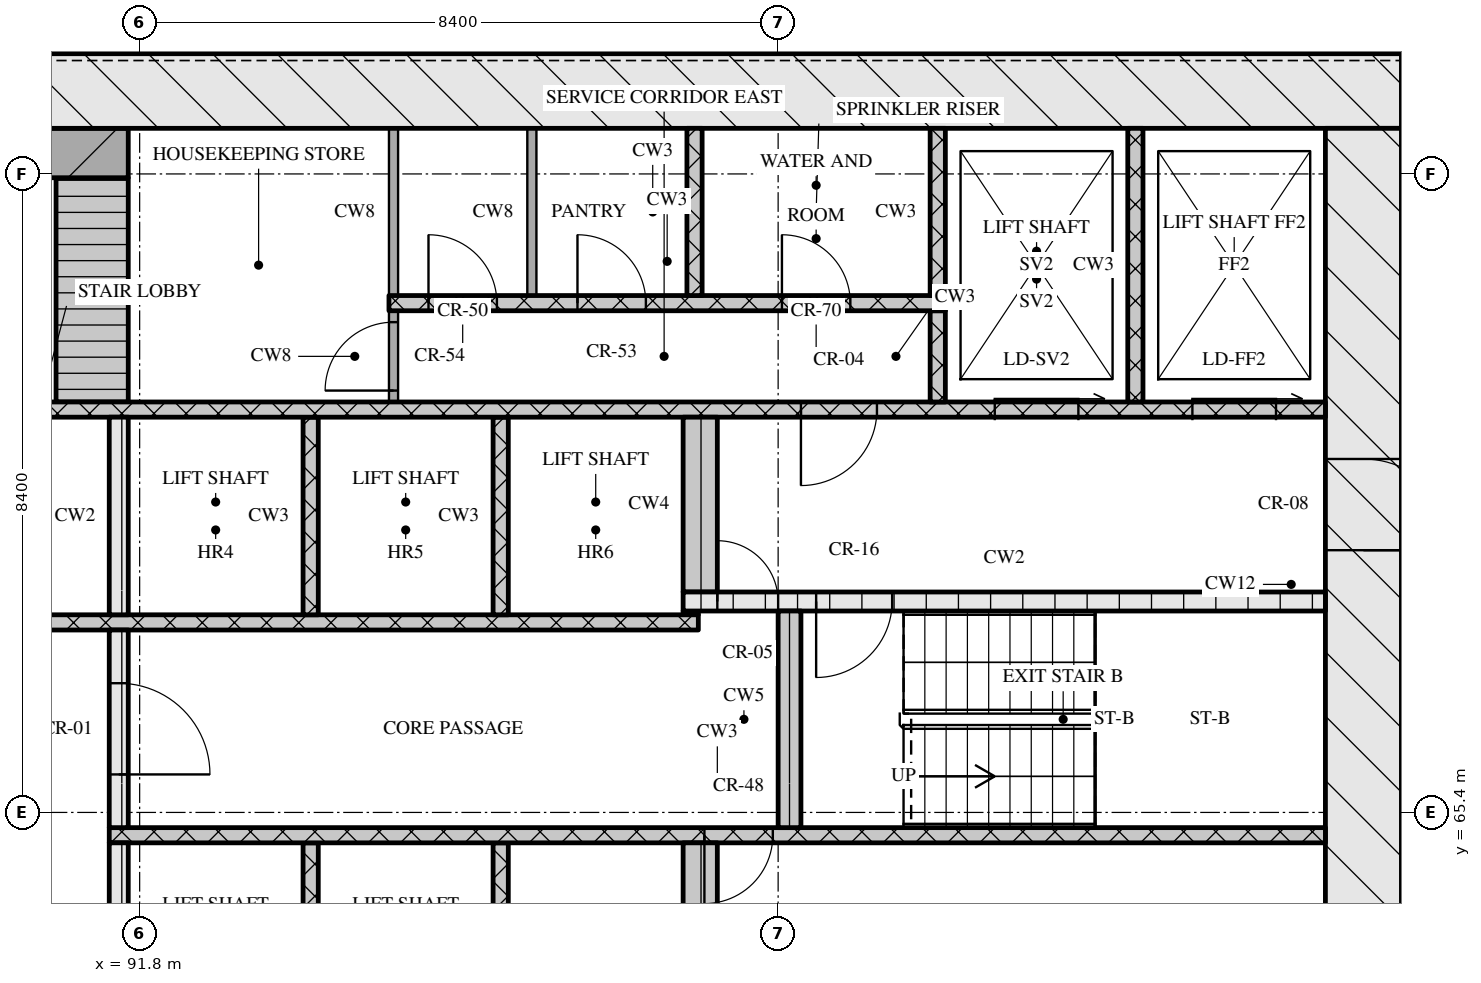
"""IFC4 building model, lengths in metres.
Left out: names, types, materials, properties, quantities, classifications, styles, units other than length and angle.
Written with IfcOpenShell. Run it as: python <this file> out.ifc"""

import sys

from ifc_helpers import new_model, si_unit, direction, frame, frame_2d, origin, place, context, subcontext, project, spatial, rectangle, extrude, element, fill, save


model = new_model("IFC4")
c1 = context("Model", 3, precision=1e-05, world=origin(), true_north=direction((0.0, 1.0)))
c2 = subcontext(c1, "Body", "Model", "MODEL_VIEW")
j1 = project(units=[si_unit("LENGTHUNIT", "METRE"), si_unit("PLANEANGLEUNIT", "RADIAN")], contexts=[c1])
p1 = place(None, origin())
s1 = spatial("IfcSite", under=j1, at=p1, CompositionType="ELEMENT")
p2 = place(p1, origin())
s2 = spatial("IfcBuilding", under=s1, at=p2, CompositionType="ELEMENT")
p3 = place(p2, frame((0.0, 0.0, 124.05)))
s3 = spatial("IfcBuildingStorey", under=s2, at=p3, CompositionType="ELEMENT", Elevation=124.05)
p4 = place(p3, frame((66.8, 74.9, 0.0), z_axis=(0.0, 0.0, 1.0), x_axis=(1.0, 0.0, 0.0)))
e1 = element("IfcWall", 1, at=p4, inside=s3, PredefinedType="SOLIDWALL", context=c2, shape_type="SweptSolid", body=[
    extrude(rectangle(XDim=41.6, YDim=1.0, at=frame_2d((20.8, 0.0))), origin(), (0.0, 0.0, 1.0), 3.32),
])
p5 = place(p3, frame((107.9, 62.4, 0.0), z_axis=(0.0, 0.0, 1.0), x_axis=(0.0, 1.0, 0.0)))
e2 = element("IfcWall", 2, at=p5, inside=s3, PredefinedType="SOLIDWALL", context=c2, shape_type="SweptSolid", body=[
    extrude(rectangle(XDim=12.0, YDim=1.0, at=frame_2d((6.0, 0.0))), origin(), (0.0, 0.0, 1.0), 3.32),
])
p6 = place(p5, frame((6.45, 0.0, 0.0)))
e3 = element("IfcOpeningElement", 3, at=p6, cuts=e2, PredefinedType="OPENING", context=c2, shape_type="SweptSolid", body=[
    extrude(rectangle(XDim=1.2, YDim=2.1, at=frame_2d((0.6, 1.05))), frame((0.0, 0.51, 0.0), z_axis=(0.0, -1.0, 0.0), x_axis=(1.0, 0.0, 0.0)), (0.0, 0.0, 1.0), 1.02),
])
p7 = place(p3, frame((91.525, 62.4, 0.0), z_axis=(0.0, 0.0, 1.0), x_axis=(0.0, 1.0, 0.0)))
e4 = element("IfcWall", 4, at=p7, inside=s3, PredefinedType="SOLIDWALL", context=c2, shape_type="SweptSolid", body=[
    extrude(rectangle(XDim=2.6, YDim=0.25, at=frame_2d((1.3, 0.0))), origin(), (0.0, 0.0, 1.0), 3.32),
])
for number, where, z_axis, x_axis in (
    (5, (94.05, 62.4, 0.0), (0.0, 0.0, 1.0), (0.0, 1.0, 0.0)),
    (6, (96.55, 62.4, 0.0), (0.0, 0.0, 1.0), (0.0, 1.0, 0.0)),
):
    element("IfcWall", number, at=place(p3, frame(where, z_axis=z_axis, x_axis=x_axis)), inside=s3, PredefinedType="SOLIDWALL", context=c2, shape_type="SweptSolid", body=[
        extrude(rectangle(XDim=2.6, YDim=0.2, at=frame_2d((1.3, 0.0))), origin(), (0.0, 0.0, 1.0), 3.32),
    ])
p8 = place(p3, frame((99.175, 62.4, 0.0), z_axis=(0.0, 0.0, 1.0), x_axis=(0.0, 1.0, 0.0)))
e7 = element("IfcWall", 7, at=p8, inside=s3, PredefinedType="SOLIDWALL", context=c2, shape_type="SweptSolid", body=[
    extrude(rectangle(XDim=2.6, YDim=0.45, at=frame_2d((1.3, 0.0))), origin(), (0.0, 0.0, 1.0), 3.32),
])
p9 = place(p3, frame((91.4, 65.1, 0.0), z_axis=(0.0, 0.0, 1.0), x_axis=(1.0, 0.0, 0.0)))
e8 = element("IfcWall", 8, at=p9, inside=s3, PredefinedType="SOLIDWALL", context=c2, shape_type="SweptSolid", body=[
    extrude(rectangle(XDim=16.0, YDim=0.2, at=frame_2d((8.0, 0.0))), origin(), (0.0, 0.0, 1.0), 3.32),
])
p10 = place(p9, frame((7.83, 0.0, 0.0)))
e9 = element("IfcOpeningElement", 9, at=p10, cuts=e8, PredefinedType="OPENING", context=c2, shape_type="SweptSolid", body=[
    extrude(rectangle(XDim=0.9, YDim=2.1, at=frame_2d((0.45, 1.05))), frame((0.0, 0.11, 0.0), z_axis=(0.0, -1.0, 0.0), x_axis=(1.0, 0.0, 0.0)), (0.0, 0.0, 1.0), 0.22),
])
p11 = place(p3, frame((91.525, 65.2, 0.0), z_axis=(0.0, 0.0, 1.0), x_axis=(0.0, 1.0, 0.0)))
e10 = element("IfcWall", 10, at=p11, inside=s3, PredefinedType="SOLIDWALL", context=c2, shape_type="SweptSolid", body=[
    extrude(rectangle(XDim=2.6, YDim=0.25, at=frame_2d((1.3, 0.0))), origin(), (0.0, 0.0, 1.0), 3.32),
])
p12 = place(p11, frame((0.7, 0.0, 0.0)))
e11 = element("IfcOpeningElement", 11, at=p12, cuts=e10, PredefinedType="OPENING", context=c2, shape_type="SweptSolid", body=[
    extrude(rectangle(XDim=1.2, YDim=2.1, at=frame_2d((0.6, 1.05))), frame((0.0, 0.135, 0.0), z_axis=(0.0, -1.0, 0.0), x_axis=(1.0, 0.0, 0.0)), (0.0, 0.0, 1.0), 0.27),
])
p13 = place(p3, frame((100.35, 65.2, 0.0), z_axis=(0.0, 0.0, 1.0), x_axis=(0.0, 1.0, 0.0)))
e12 = element("IfcWall", 12, at=p13, inside=s3, PredefinedType="SOLIDWALL", context=c2, shape_type="SweptSolid", body=[
    extrude(rectangle(XDim=2.85, YDim=0.3, at=frame_2d((1.425, 0.0))), origin(), (0.0, 0.0, 1.0), 3.32),
])
p14 = place(p3, frame((76.05, 67.9, 0.0), z_axis=(0.0, 0.0, 1.0), x_axis=(1.0, 0.0, 0.0)))
e13 = element("IfcWall", 13, at=p14, inside=s3, PredefinedType="SOLIDWALL", context=c2, shape_type="SweptSolid", body=[
    extrude(rectangle(XDim=23.1, YDim=0.2, at=frame_2d((11.55, 0.0))), origin(), (0.0, 0.0, 1.0), 3.32),
])
p15 = place(p14, frame((0.6, 0.0, 0.0)))
e14 = element("IfcOpeningElement", 14, at=p15, cuts=e13, PredefinedType="OPENING", context=c2, shape_type="SweptSolid", body=[
    extrude(rectangle(XDim=1.1, YDim=2.1, at=frame_2d((0.55, 1.05))), frame((0.0, 0.11, 0.0), z_axis=(0.0, -1.0, 0.0), x_axis=(1.0, 0.0, 0.0)), (0.0, 0.0, 1.0), 0.22),
])
p16 = place(p14, frame((3.1, 0.0, 0.0)))
e15 = element("IfcOpeningElement", 15, at=p16, cuts=e13, PredefinedType="OPENING", context=c2, shape_type="SweptSolid", body=[
    extrude(rectangle(XDim=1.1, YDim=2.1, at=frame_2d((0.55, 1.05))), frame((0.0, 0.11, 0.0), z_axis=(0.0, -1.0, 0.0), x_axis=(1.0, 0.0, 0.0)), (0.0, 0.0, 1.0), 0.22),
])
p17 = place(p14, frame((5.6, 0.0, 0.0)))
e16 = element("IfcOpeningElement", 16, at=p17, cuts=e13, PredefinedType="OPENING", context=c2, shape_type="SweptSolid", body=[
    extrude(rectangle(XDim=1.1, YDim=2.1, at=frame_2d((0.55, 1.05))), frame((0.0, 0.11, 0.0), z_axis=(0.0, -1.0, 0.0), x_axis=(1.0, 0.0, 0.0)), (0.0, 0.0, 1.0), 0.22),
])
p18 = place(p14, frame((8.45, 0.0, 0.0)))
e17 = element("IfcOpeningElement", 17, at=p18, cuts=e13, PredefinedType="OPENING", context=c2, shape_type="SweptSolid", body=[
    extrude(rectangle(XDim=0.9, YDim=2.1, at=frame_2d((0.45, 1.05))), frame((0.0, 0.11, 0.0), z_axis=(0.0, -1.0, 0.0), x_axis=(1.0, 0.0, 0.0)), (0.0, 0.0, 1.0), 0.22),
])
p19 = place(p14, frame((10.91, 0.0, 0.0)))
e18 = element("IfcOpeningElement", 18, at=p19, cuts=e13, PredefinedType="OPENING", context=c2, shape_type="SweptSolid", body=[
    extrude(rectangle(XDim=0.9, YDim=2.1, at=frame_2d((0.45, 1.05))), frame((0.0, 0.11, 0.0), z_axis=(0.0, -1.0, 0.0), x_axis=(1.0, 0.0, 0.0)), (0.0, 0.0, 1.0), 0.22),
])
p20 = place(p14, frame((13.55, 0.0, 0.0)))
e19 = element("IfcOpeningElement", 19, at=p20, cuts=e13, PredefinedType="OPENING", context=c2, shape_type="SweptSolid", body=[
    extrude(rectangle(XDim=1.0, YDim=2.1, at=frame_2d((0.5, 1.05))), frame((0.0, 0.11, 0.0), z_axis=(0.0, -1.0, 0.0), x_axis=(1.0, 0.0, 0.0)), (0.0, 0.0, 1.0), 0.22),
])
p21 = place(p3, frame((91.525, 68.0, 0.0), z_axis=(0.0, 0.0, 1.0), x_axis=(0.0, 1.0, 0.0)))
e20 = element("IfcWall", 20, at=p21, inside=s3, PredefinedType="SOLIDWALL", context=c2, shape_type="SweptSolid", body=[
    extrude(rectangle(XDim=2.6, YDim=0.25, at=frame_2d((1.3, 0.0))), origin(), (0.0, 0.0, 1.0), 3.32),
])
for number, where, z_axis, x_axis in (
    (21, (94.05, 68.0, 0.0), (0.0, 0.0, 1.0), (0.0, 1.0, 0.0)),
    (22, (96.55, 68.0, 0.0), (0.0, 0.0, 1.0), (0.0, 1.0, 0.0)),
):
    element("IfcWall", number, at=place(p3, frame(where, z_axis=z_axis, x_axis=x_axis)), inside=s3, PredefinedType="SOLIDWALL", context=c2, shape_type="SweptSolid", body=[
        extrude(rectangle(XDim=2.6, YDim=0.2, at=frame_2d((1.3, 0.0))), origin(), (0.0, 0.0, 1.0), 3.32),
    ])
p22 = place(p3, frame((98.95, 68.025, 0.0), z_axis=(0.0, 0.0, 1.0), x_axis=(1.0, 0.0, 0.0)))
e23 = element("IfcWall", 23, at=p22, inside=s3, PredefinedType="SOLIDWALL", context=c2, shape_type="SweptSolid", body=[
    extrude(rectangle(XDim=0.2, YDim=0.05, at=frame_2d((0.1, 0.0))), origin(), (0.0, 0.0, 1.0), 3.32),
])
p23 = place(p3, frame((98.95, 68.175, 0.0), z_axis=(0.0, 0.0, 1.0), x_axis=(1.0, 0.0, 0.0)))
e24 = element("IfcWall", 24, at=p23, inside=s3, PredefinedType="SOLIDWALL", context=c2, shape_type="SweptSolid", body=[
    extrude(rectangle(XDim=8.45, YDim=0.25, at=frame_2d((4.225, 0.0))), origin(), (0.0, 0.0, 1.0), 3.32),
])
p24 = place(p23, frame((0.45, 0.0, 0.0)))
e25 = element("IfcOpeningElement", 25, at=p24, cuts=e24, PredefinedType="OPENING", context=c2, shape_type="SweptSolid", body=[
    extrude(rectangle(XDim=0.8, YDim=2.1, at=frame_2d((0.4, 1.05))), frame((0.0, 0.135, 0.0), z_axis=(0.0, -1.0, 0.0), x_axis=(1.0, 0.0, 0.0)), (0.0, 0.0, 1.0), 0.27),
])
p25 = place(p23, frame((1.75, 0.0, 0.0)))
e26 = element("IfcOpeningElement", 26, at=p25, cuts=e24, PredefinedType="OPENING", context=c2, shape_type="SweptSolid", body=[
    extrude(rectangle(XDim=1.0, YDim=2.1, at=frame_2d((0.5, 1.05))), frame((0.0, 0.135, 0.0), z_axis=(0.0, -1.0, 0.0), x_axis=(1.0, 0.0, 0.0)), (0.0, 0.0, 1.0), 0.27),
])
p26 = place(p3, frame((99.175, 68.3, 0.0), z_axis=(0.0, 0.0, 1.0), x_axis=(0.0, 1.0, 0.0)))
e27 = element("IfcWall", 27, at=p26, inside=s3, PredefinedType="SOLIDWALL", context=c2, shape_type="SweptSolid", body=[
    extrude(rectangle(XDim=2.3, YDim=0.45, at=frame_2d((1.15, 0.0))), origin(), (0.0, 0.0, 1.0), 3.32),
])
p27 = place(p3, frame((67.8, 70.7, 0.0), z_axis=(0.0, 0.0, 1.0), x_axis=(1.0, 0.0, 0.0)))
e28 = element("IfcWall", 28, at=p27, inside=s3, PredefinedType="SOLIDWALL", context=c2, shape_type="SweptSolid", body=[
    extrude(rectangle(XDim=39.6, YDim=0.2, at=frame_2d((19.8, 0.0))), origin(), (0.0, 0.0, 1.0), 3.32),
])
p28 = place(p27, frame((0.65, 0.0, 0.0)))
e29 = element("IfcOpeningElement", 29, at=p28, cuts=e28, PredefinedType="OPENING", context=c2, shape_type="SweptSolid", body=[
    extrude(rectangle(XDim=1.1, YDim=2.1, at=frame_2d((0.55, 1.05))), frame((0.0, 0.11, 0.0), z_axis=(0.0, -1.0, 0.0), x_axis=(1.0, 0.0, 0.0)), (0.0, 0.0, 1.0), 0.22),
])
p29 = place(p27, frame((3.25, 0.0, 0.0)))
e30 = element("IfcOpeningElement", 30, at=p29, cuts=e28, PredefinedType="OPENING", context=c2, shape_type="SweptSolid", body=[
    extrude(rectangle(XDim=1.1, YDim=2.1, at=frame_2d((0.55, 1.05))), frame((0.0, 0.11, 0.0), z_axis=(0.0, -1.0, 0.0), x_axis=(1.0, 0.0, 0.0)), (0.0, 0.0, 1.0), 0.22),
])
p30 = place(p27, frame((5.9, 0.0, 0.0)))
e31 = element("IfcOpeningElement", 31, at=p30, cuts=e28, PredefinedType="OPENING", context=c2, shape_type="SweptSolid", body=[
    extrude(rectangle(XDim=1.0, YDim=2.1, at=frame_2d((0.5, 1.05))), frame((0.0, 0.11, 0.0), z_axis=(0.0, -1.0, 0.0), x_axis=(1.0, 0.0, 0.0)), (0.0, 0.0, 1.0), 0.22),
])
p31 = place(p27, frame((21.7, 0.0, 0.0)))
e32 = element("IfcOpeningElement", 32, at=p31, cuts=e28, PredefinedType="OPENING", context=c2, shape_type="SweptSolid", body=[
    extrude(rectangle(XDim=1.0, YDim=2.1, at=frame_2d((0.5, 1.05))), frame((0.0, 0.11, 0.0), z_axis=(0.0, -1.0, 0.0), x_axis=(1.0, 0.0, 0.0)), (0.0, 0.0, 1.0), 0.22),
])
p32 = place(p27, frame((32.7, 0.0, 0.0)))
e33 = element("IfcOpeningElement", 33, at=p32, cuts=e28, PredefinedType="OPENING", context=c2, shape_type="SweptSolid", body=[
    extrude(rectangle(XDim=1.0, YDim=2.1, at=frame_2d((0.5, 1.05))), frame((0.0, 0.11, 0.0), z_axis=(0.0, -1.0, 0.0), x_axis=(1.0, 0.0, 0.0)), (0.0, 0.0, 1.0), 0.22),
])
p33 = place(p27, frame((35.25, 0.0, 0.0)))
e34 = element("IfcOpeningElement", 34, at=p33, cuts=e28, PredefinedType="OPENING", context=c2, shape_type="SweptSolid", body=[
    extrude(rectangle(XDim=1.1, YDim=2.1, at=frame_2d((0.55, 1.05))), frame((0.0, 0.11, 0.0), z_axis=(0.0, -1.0, 0.0), x_axis=(1.0, 0.0, 0.0)), (0.0, 0.0, 1.0), 0.22),
])
p34 = place(p27, frame((37.85, 0.0, 0.0)))
e35 = element("IfcOpeningElement", 35, at=p34, cuts=e28, PredefinedType="OPENING", context=c2, shape_type="SweptSolid", body=[
    extrude(rectangle(XDim=1.1, YDim=2.1, at=frame_2d((0.55, 1.05))), frame((0.0, 0.11, 0.0), z_axis=(0.0, -1.0, 0.0), x_axis=(1.0, 0.0, 0.0)), (0.0, 0.0, 1.0), 0.22),
])
p35 = place(p3, frame((91.175, 70.8, 0.0), z_axis=(0.0, 0.0, 1.0), x_axis=(0.0, 1.0, 0.0)))
e36 = element("IfcWall", 36, at=p35, inside=s3, PredefinedType="SOLIDWALL", context=c2, shape_type="SweptSolid", body=[
    extrude(rectangle(XDim=2.95, YDim=0.95, at=frame_2d((1.475, 0.0))), origin(), (0.0, 0.0, 1.0), 3.32),
])
p36 = place(p3, frame((95.14, 70.8, 0.0), z_axis=(0.0, 0.0, 1.0), x_axis=(0.0, 1.0, 0.0)))
e37 = element("IfcWall", 37, at=p36, inside=s3, PredefinedType="PARTITIONING", context=c2, shape_type="SweptSolid", body=[
    extrude(rectangle(XDim=1.2, YDim=0.12, at=frame_2d((0.6, 0.0))), origin(), (0.0, 0.0, 1.0), 3.32),
])
p37 = place(p36, frame((0.15, 0.0, 0.0)))
e38 = element("IfcOpeningElement", 38, at=p37, cuts=e37, PredefinedType="OPENING", context=c2, shape_type="SweptSolid", body=[
    extrude(rectangle(XDim=0.9, YDim=2.1, at=frame_2d((0.45, 1.05))), frame((0.0, 0.07, 0.0), z_axis=(0.0, -1.0, 0.0), x_axis=(1.0, 0.0, 0.0)), (0.0, 0.0, 1.0), 0.14),
])
p38 = place(p3, frame((102.3, 70.8, 0.0), z_axis=(0.0, 0.0, 1.0), x_axis=(0.0, 1.0, 0.0)))
e39 = element("IfcWall", 39, at=p38, inside=s3, PredefinedType="SOLIDWALL", context=c2, shape_type="SweptSolid", body=[
    extrude(rectangle(XDim=1.2, YDim=0.2, at=frame_2d((0.6, 0.0))), origin(), (0.0, 0.0, 1.0), 3.32),
])
p39 = place(p3, frame((104.9, 70.8, 0.0), z_axis=(0.0, 0.0, 1.0), x_axis=(0.0, 1.0, 0.0)))
e40 = element("IfcWall", 40, at=p39, inside=s3, PredefinedType="SOLIDWALL", context=c2, shape_type="SweptSolid", body=[
    extrude(rectangle(XDim=3.6, YDim=0.2, at=frame_2d((1.8, 0.0))), origin(), (0.0, 0.0, 1.0), 3.32),
])
p40 = place(p3, frame((95.08, 72.1, 0.0), z_axis=(0.0, 0.0, 1.0), x_axis=(1.0, 0.0, 0.0)))
e41 = element("IfcWall", 41, at=p40, inside=s3, PredefinedType="SOLIDWALL", context=c2, shape_type="SweptSolid", body=[
    extrude(rectangle(XDim=7.32, YDim=0.2, at=frame_2d((3.66, 0.0))), origin(), (0.0, 0.0, 1.0), 3.32),
])
p41 = place(p40, frame((0.52, 0.0, 0.0)))
e42 = element("IfcOpeningElement", 42, at=p41, cuts=e41, PredefinedType="OPENING", context=c2, shape_type="SweptSolid", body=[
    extrude(rectangle(XDim=0.9, YDim=2.1, at=frame_2d((0.45, 1.05))), frame((0.0, 0.11, 0.0), z_axis=(0.0, -1.0, 0.0), x_axis=(1.0, 0.0, 0.0)), (0.0, 0.0, 1.0), 0.22),
])
p42 = place(p40, frame((2.48, 0.0, 0.0)))
e43 = element("IfcOpeningElement", 43, at=p42, cuts=e41, PredefinedType="OPENING", context=c2, shape_type="SweptSolid", body=[
    extrude(rectangle(XDim=0.9, YDim=2.1, at=frame_2d((0.45, 1.05))), frame((0.0, 0.11, 0.0), z_axis=(0.0, -1.0, 0.0), x_axis=(1.0, 0.0, 0.0)), (0.0, 0.0, 1.0), 0.22),
])
p43 = place(p40, frame((5.17, 0.0, 0.0)))
e44 = element("IfcOpeningElement", 44, at=p43, cuts=e41, PredefinedType="OPENING", context=c2, shape_type="SweptSolid", body=[
    extrude(rectangle(XDim=0.9, YDim=2.1, at=frame_2d((0.45, 1.05))), frame((0.0, 0.11, 0.0), z_axis=(0.0, -1.0, 0.0), x_axis=(1.0, 0.0, 0.0)), (0.0, 0.0, 1.0), 0.22),
])
for number, where, z_axis, x_axis in (
    (45, (95.14, 72.2, 0.0), (0.0, 0.0, 1.0), (0.0, 1.0, 0.0)),
    (46, (96.96, 72.2, 0.0), (0.0, 0.0, 1.0), (0.0, 1.0, 0.0)),
):
    element("IfcWall", number, at=place(p3, frame(where, z_axis=z_axis, x_axis=x_axis)), inside=s3, PredefinedType="PARTITIONING", context=c2, shape_type="SweptSolid", body=[
        extrude(rectangle(XDim=2.2, YDim=0.12, at=frame_2d((1.1, 0.0))), origin(), (0.0, 0.0, 1.0), 3.32),
    ])
for number, where, z_axis, x_axis in (
    (47, (99.1, 72.2, 0.0), (0.0, 0.0, 1.0), (0.0, 1.0, 0.0)),
    (48, (102.3, 72.2, 0.0), (0.0, 0.0, 1.0), (0.0, 1.0, 0.0)),
):
    element("IfcWall", number, at=place(p3, frame(where, z_axis=z_axis, x_axis=x_axis)), inside=s3, PredefinedType="SOLIDWALL", context=c2, shape_type="SweptSolid", body=[
        extrude(rectangle(XDim=2.2, YDim=0.2, at=frame_2d((1.1, 0.0))), origin(), (0.0, 0.0, 1.0), 3.32),
    ])
p44 = place(p3, frame((83.55, 74.075, 0.0), z_axis=(0.0, 0.0, 1.0), x_axis=(1.0, 0.0, 0.0)))
e49 = element("IfcWall", 49, at=p44, inside=s3, PredefinedType="SOLIDWALL", context=c2, shape_type="SweptSolid", body=[
    extrude(rectangle(XDim=8.1, YDim=0.65, at=frame_2d((4.05, 0.0))), origin(), (0.0, 0.0, 1.0), 3.32),
])
p45 = place(p10, origin())
e50 = element("IfcDoor", 50, at=p45, inside=s3, OperationType="SINGLE_SWING_RIGHT", PredefinedType="DOOR", context=c2, shape_type="SweptSolid", body=[
    extrude(rectangle(XDim=0.9, YDim=2.1, at=frame_2d((0.45, 1.05))), frame((0.0, 0.025, 0.0), z_axis=(0.0, -1.0, 0.0), x_axis=(1.0, 0.0, 0.0)), (0.0, 0.0, 1.0), 0.05),
])
fill(e9, e50)
p46 = place(p12, origin())
e51 = element("IfcDoor", 51, at=p46, inside=s3, OperationType="SINGLE_SWING_RIGHT", PredefinedType="DOOR", context=c2, shape_type="SweptSolid", body=[
    extrude(rectangle(XDim=1.2, YDim=2.1, at=frame_2d((0.6, 1.05))), frame((0.0, 0.025, 0.0), z_axis=(0.0, -1.0, 0.0), x_axis=(1.0, 0.0, 0.0)), (0.0, 0.0, 1.0), 0.05),
])
fill(e11, e51)
p47 = place(p24, origin())
e52 = element("IfcDoor", 52, at=p47, inside=s3, OperationType="SINGLE_SWING_LEFT", PredefinedType="DOOR", context=c2, shape_type="SweptSolid", body=[
    extrude(rectangle(XDim=0.8, YDim=2.1, at=frame_2d((0.4, 1.05))), frame((0.0, 0.025, 0.0), z_axis=(0.0, -1.0, 0.0), x_axis=(1.0, 0.0, 0.0)), (0.0, 0.0, 1.0), 0.05),
])
fill(e25, e52)
p48 = place(p25, origin())
e53 = element("IfcDoor", 53, at=p48, inside=s3, OperationType="SINGLE_SWING_RIGHT", PredefinedType="DOOR", context=c2, shape_type="SweptSolid", body=[
    extrude(rectangle(XDim=1.0, YDim=2.1, at=frame_2d((0.5, 1.05))), frame((0.0, 0.025, 0.0), z_axis=(0.0, -1.0, 0.0), x_axis=(1.0, 0.0, 0.0)), (0.0, 0.0, 1.0), 0.05),
])
fill(e26, e53)
p49 = place(p6, origin())
e54 = element("IfcDoor", 54, at=p49, inside=s3, OperationType="SINGLE_SWING_RIGHT", PredefinedType="DOOR", context=c2, shape_type="SweptSolid", body=[
    extrude(rectangle(XDim=1.2, YDim=2.1, at=frame_2d((0.6, 1.05))), frame((0.0, 0.025, 0.0), z_axis=(0.0, -1.0, 0.0), x_axis=(1.0, 0.0, 0.0)), (0.0, 0.0, 1.0), 0.05),
])
fill(e3, e54)
p50 = place(p32, origin())
e55 = element("IfcDoor", 55, at=p50, inside=s3, OperationType="SINGLE_SWING_RIGHT", PredefinedType="DOOR", context=c2, shape_type="SweptSolid", body=[
    extrude(rectangle(XDim=1.0, YDim=2.1, at=frame_2d((0.5, 1.05))), frame((0.0, 0.025, 0.0), z_axis=(0.0, -1.0, 0.0), x_axis=(1.0, 0.0, 0.0)), (0.0, 0.0, 1.0), 0.05),
])
fill(e33, e55)
p51 = place(p33, origin())
e56 = element("IfcDoor", 56, at=p51, inside=s3, OperationType="SLIDING_TO_RIGHT", PredefinedType="DOOR", context=c2, shape_type="SweptSolid", body=[
    extrude(rectangle(XDim=1.1, YDim=2.1, at=frame_2d((0.55, 1.05))), frame((0.0, 0.025, 0.0), z_axis=(0.0, -1.0, 0.0), x_axis=(1.0, 0.0, 0.0)), (0.0, 0.0, 1.0), 0.05),
])
fill(e34, e56)
p52 = place(p34, origin())
e57 = element("IfcDoor", 57, at=p52, inside=s3, OperationType="SLIDING_TO_RIGHT", PredefinedType="DOOR", context=c2, shape_type="SweptSolid", body=[
    extrude(rectangle(XDim=1.1, YDim=2.1, at=frame_2d((0.55, 1.05))), frame((0.0, 0.025, 0.0), z_axis=(0.0, -1.0, 0.0), x_axis=(1.0, 0.0, 0.0)), (0.0, 0.0, 1.0), 0.05),
])
fill(e35, e57)
p53 = place(p37, origin())
e58 = element("IfcDoor", 58, at=p53, inside=s3, OperationType="SINGLE_SWING_LEFT", PredefinedType="DOOR", context=c2, shape_type="SweptSolid", body=[
    extrude(rectangle(XDim=0.9, YDim=2.1, at=frame_2d((0.45, 1.05))), frame((0.0, 0.025, 0.0), z_axis=(0.0, -1.0, 0.0), x_axis=(1.0, 0.0, 0.0)), (0.0, 0.0, 1.0), 0.05),
])
fill(e38, e58)
p54 = place(p41, origin())
e59 = element("IfcDoor", 59, at=p54, inside=s3, OperationType="SINGLE_SWING_LEFT", PredefinedType="DOOR", context=c2, shape_type="SweptSolid", body=[
    extrude(rectangle(XDim=0.9, YDim=2.1, at=frame_2d((0.45, 1.05))), frame((0.0, 0.025, 0.0), z_axis=(0.0, -1.0, 0.0), x_axis=(1.0, 0.0, 0.0)), (0.0, 0.0, 1.0), 0.05),
])
fill(e42, e59)
p55 = place(p42, origin())
e60 = element("IfcDoor", 60, at=p55, inside=s3, OperationType="SINGLE_SWING_LEFT", PredefinedType="DOOR", context=c2, shape_type="SweptSolid", body=[
    extrude(rectangle(XDim=0.9, YDim=2.1, at=frame_2d((0.45, 1.05))), frame((0.0, 0.025, 0.0), z_axis=(0.0, -1.0, 0.0), x_axis=(1.0, 0.0, 0.0)), (0.0, 0.0, 1.0), 0.05),
])
fill(e43, e60)
p56 = place(p43, origin())
e61 = element("IfcDoor", 61, at=p56, inside=s3, OperationType="SINGLE_SWING_LEFT", PredefinedType="DOOR", context=c2, shape_type="SweptSolid", body=[
    extrude(rectangle(XDim=0.9, YDim=2.1, at=frame_2d((0.45, 1.05))), frame((0.0, 0.025, 0.0), z_axis=(0.0, -1.0, 0.0), x_axis=(1.0, 0.0, 0.0)), (0.0, 0.0, 1.0), 0.05),
])
fill(e44, e61)
save(model, sys.argv[1])
